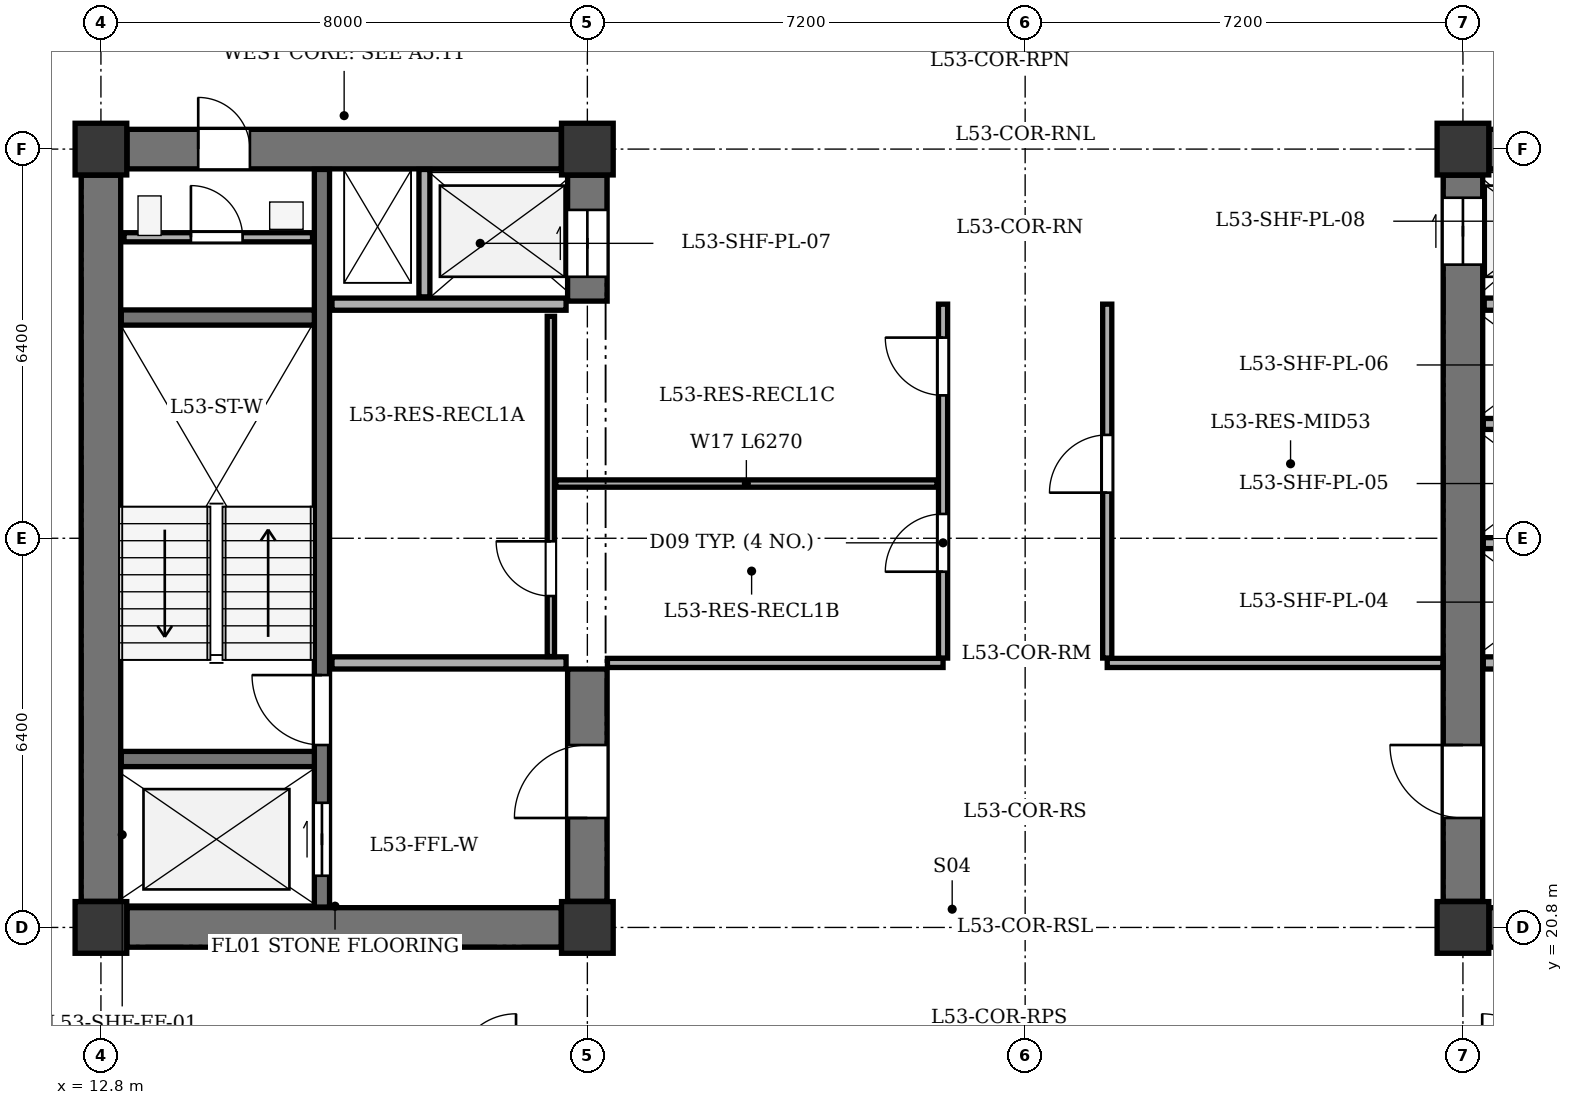
"""IFC4 building model, lengths in metres.
Left out: names, types, materials, properties, quantities, classifications, styles, units other than length and angle.
Written with IfcOpenShell. Run it as: python <this file> out.ifc"""

import sys

from ifc_helpers import new_model, si_unit, direction, frame, frame_2d, origin, origin_2d, place, context, subcontext, project, spatial, rectangle, extrude, element, fill, save


model = new_model("IFC4")
c1 = context("Model", 3, precision=1e-05, world=origin(), true_north=direction((0.0, 1.0)))
c2 = subcontext(c1, "Body", "Model", "MODEL_VIEW")
j1 = project(units=[si_unit("LENGTHUNIT", "METRE"), si_unit("PLANEANGLEUNIT", "RADIAN")], contexts=[c1])
p1 = place(None, origin())
s1 = spatial("IfcSite", under=j1, at=p1, CompositionType="ELEMENT")
p2 = place(p1, origin())
s2 = spatial("IfcBuilding", under=s1, at=p2, CompositionType="ELEMENT")
p3 = place(p2, frame((0.0, 0.0, 207.5)))
s3 = spatial("IfcBuildingStorey", under=s2, at=p3, CompositionType="ELEMENT", Elevation=207.5)
for number, where, z_axis, x_axis in (
    (1, (12.8, 20.8, 0.0), (0.0, 0.0, 1.0), (1.0, 0.0, 0.0)),
    (2, (20.8, 20.8, 0.0), (0.0, 0.0, 1.0), (1.0, 0.0, 0.0)),
    (3, (12.8, 33.6, 0.0), (0.0, 0.0, 1.0), (1.0, 0.0, 0.0)),
    (4, (20.8, 33.6, 0.0), (0.0, 0.0, 1.0), (1.0, 0.0, 0.0)),
    (5, (35.2, 20.8, 0.0), (0.0, 0.0, 1.0), (1.0, 0.0, 0.0)),
    (6, (35.2, 33.6, 0.0), (0.0, 0.0, 1.0), (1.0, 0.0, 0.0)),
):
    element("IfcColumn", number, at=place(p3, frame(where, z_axis=z_axis, x_axis=x_axis)), inside=s3, PredefinedType="COLUMN", context=c2, shape_type="SweptSolid", body=[
        extrude(rectangle(XDim=0.85, YDim=0.85, at=origin_2d()), origin(), (0.0, 0.0, 1.0), 3.4),
    ])
p4 = place(p3, frame((12.8, 21.23, 0.0), z_axis=(0.0, 0.0, 1.0), x_axis=(0.0, 1.0, 0.0)))
e7 = element("IfcWall", 7, at=p4, inside=s3, PredefinedType="SHEAR", context=c2, shape_type="SweptSolid", body=[
    extrude(rectangle(XDim=11.94, YDim=0.65, at=frame_2d((5.97, 0.0))), origin(), (0.0, 0.0, 1.0), 3.1),
])
p5 = place(p3, frame((13.23, 20.8, 0.0), z_axis=(0.0, 0.0, 1.0), x_axis=(1.0, 0.0, 0.0)))
e8 = element("IfcWall", 8, at=p5, inside=s3, PredefinedType="SHEAR", context=c2, shape_type="SweptSolid", body=[
    extrude(rectangle(XDim=7.14, YDim=0.65, at=frame_2d((3.57, 0.0))), origin(), (0.0, 0.0, 1.0), 3.1),
])
p6 = place(p3, frame((13.23, 33.6, 0.0), z_axis=(0.0, 0.0, 1.0), x_axis=(1.0, 0.0, 0.0)))
e9 = element("IfcWall", 9, at=p6, inside=s3, PredefinedType="SHEAR", context=c2, shape_type="SweptSolid", body=[
    extrude(rectangle(XDim=7.14, YDim=0.65, at=frame_2d((3.57, 0.0))), origin(), (0.0, 0.0, 1.0), 3.1),
])
p7 = place(p6, frame((1.17, 0.0, 0.0)))
e10 = element("IfcOpeningElement", 10, at=p7, cuts=e9, PredefinedType="OPENING", context=c2, shape_type="SweptSolid", body=[
    extrude(rectangle(XDim=0.85, YDim=2.02, at=frame_2d((0.425, 1.01))), frame((0.0, 0.335, 0.0), z_axis=(0.0, -1.0, 0.0), x_axis=(1.0, 0.0, 0.0)), (0.0, 0.0, 1.0), 0.67),
])
p8 = place(p3, frame((20.8, 21.23, 0.0), z_axis=(0.0, 0.0, 1.0), x_axis=(0.0, 1.0, 0.0)))
e11 = element("IfcWall", 11, at=p8, inside=s3, PredefinedType="SHEAR", context=c2, shape_type="SweptSolid", body=[
    extrude(rectangle(XDim=3.82, YDim=0.65, at=frame_2d((1.91, 0.0))), origin(), (0.0, 0.0, 1.0), 3.1),
])
p9 = place(p8, frame((1.37, 0.0, 0.0)))
e12 = element("IfcOpeningElement", 12, at=p9, cuts=e11, PredefinedType="OPENING", context=c2, shape_type="SweptSolid", body=[
    extrude(rectangle(XDim=1.2, YDim=2.15, at=frame_2d((0.6, 1.075))), frame((0.0, 0.335, 0.0), z_axis=(0.0, -1.0, 0.0), x_axis=(1.0, 0.0, 0.0)), (0.0, 0.0, 1.0), 0.67),
])
p10 = place(p3, frame((20.8, 31.1, 0.0), z_axis=(0.0, 0.0, 1.0), x_axis=(0.0, 1.0, 0.0)))
e13 = element("IfcWall", 13, at=p10, inside=s3, PredefinedType="SHEAR", context=c2, shape_type="SweptSolid", body=[
    extrude(rectangle(XDim=2.07, YDim=0.65, at=frame_2d((1.035, 0.0))), origin(), (0.0, 0.0, 1.0), 3.1),
])
p11 = place(p10, frame((0.4, 0.0, 0.0)))
e14 = element("IfcOpeningElement", 14, at=p11, cuts=e13, PredefinedType="OPENING", context=c2, shape_type="SweptSolid", body=[
    extrude(rectangle(XDim=1.1, YDim=2.1, at=frame_2d((0.55, 1.05))), frame((0.0, 0.335, 0.0), z_axis=(0.0, -1.0, 0.0), x_axis=(1.0, 0.0, 0.0)), (0.0, 0.0, 1.0), 0.67),
])
p12 = place(p3, frame((16.435, 21.135, 0.0), z_axis=(0.0, 0.0, 1.0), x_axis=(0.0, 1.0, 0.0)))
e15 = element("IfcWall", 15, at=p12, inside=s3, PredefinedType="SHEAR", context=c2, shape_type="SweptSolid", body=[
    extrude(rectangle(XDim=12.13, YDim=0.25, at=frame_2d((6.065, 0.0))), origin(), (0.0, 0.0, 1.0), 3.1),
])
p13 = place(p12, frame((0.515, 0.0, 0.0)))
e16 = element("IfcOpeningElement", 16, at=p13, cuts=e15, PredefinedType="OPENING", context=c2, shape_type="SweptSolid", body=[
    extrude(rectangle(XDim=1.2, YDim=2.15, at=frame_2d((0.6, 1.075))), frame((0.0, 0.135, 0.0), z_axis=(0.0, -1.0, 0.0), x_axis=(1.0, 0.0, 0.0)), (0.0, 0.0, 1.0), 0.27),
])
p14 = place(p12, frame((2.665, 0.0, 0.0)))
e17 = element("IfcOpeningElement", 17, at=p14, cuts=e15, PredefinedType="OPENING", context=c2, shape_type="SweptSolid", body=[
    extrude(rectangle(XDim=1.15, YDim=2.15, at=frame_2d((0.575, 1.075))), frame((0.0, 0.135, 0.0), z_axis=(0.0, -1.0, 0.0), x_axis=(1.0, 0.0, 0.0)), (0.0, 0.0, 1.0), 0.27),
])
for number, where, z_axis, x_axis in (
    (18, (13.135, 23.57, 0.0), (0.0, 0.0, 1.0), (1.0, 0.0, 0.0)),
    (19, (13.135, 30.83, 0.0), (0.0, 0.0, 1.0), (1.0, 0.0, 0.0)),
):
    element("IfcWall", number, at=place(p3, frame(where, z_axis=z_axis, x_axis=x_axis)), inside=s3, PredefinedType="SHEAR", context=c2, shape_type="SweptSolid", body=[
        extrude(rectangle(XDim=3.175, YDim=0.25, at=frame_2d((1.587, 0.0))), origin(), (0.0, 0.0, 1.0), 3.1),
    ])
for number, where, z_axis, x_axis in (
    (20, (16.6, 25.15, 0.0), (0.0, 0.0, 1.0), (1.0, 0.0, 0.0)),
    (21, (16.6, 31.05, 0.0), (0.0, 0.0, 1.0), (1.0, 0.0, 0.0)),
):
    element("IfcWall", number, at=place(p3, frame(where, z_axis=z_axis, x_axis=x_axis)), inside=s3, PredefinedType="SOLIDWALL", context=c2, shape_type="SweptSolid", body=[
        extrude(rectangle(XDim=3.85, YDim=0.2, at=frame_2d((1.925, 0.0))), origin(), (0.0, 0.0, 1.0), 3.1),
    ])
p15 = place(p3, frame((18.12, 31.17, 0.0), z_axis=(0.0, 0.0, 1.0), x_axis=(0.0, 1.0, 0.0)))
e22 = element("IfcWall", 22, at=p15, inside=s3, PredefinedType="PARTITIONING", context=c2, shape_type="SweptSolid", body=[
    extrude(rectangle(XDim=2.095, YDim=0.18, at=frame_2d((1.047, 0.0))), origin(), (0.0, 0.0, 1.0), 3.1),
])
p16 = place(p3, frame((35.63, 20.8, 0.0), z_axis=(0.0, 0.0, 1.0), x_axis=(1.0, 0.0, 0.0)))
e23 = element("IfcWall", 23, at=p16, inside=s3, PredefinedType="SHEAR", context=c2, shape_type="SweptSolid", body=[
    extrude(rectangle(XDim=7.14, YDim=0.65, at=frame_2d((3.57, 0.0))), origin(), (0.0, 0.0, 1.0), 3.1),
])
p17 = place(p3, frame((35.63, 33.6, 0.0), z_axis=(0.0, 0.0, 1.0), x_axis=(1.0, 0.0, 0.0)))
e24 = element("IfcWall", 24, at=p17, inside=s3, PredefinedType="SHEAR", context=c2, shape_type="SweptSolid", body=[
    extrude(rectangle(XDim=7.14, YDim=0.65, at=frame_2d((3.57, 0.0))), origin(), (0.0, 0.0, 1.0), 3.1),
])
p18 = place(p17, frame((4.77, 0.0, 0.0)))
e25 = element("IfcOpeningElement", 25, at=p18, cuts=e24, PredefinedType="OPENING", context=c2, shape_type="SweptSolid", body=[
    extrude(rectangle(XDim=1.3, YDim=2.15, at=frame_2d((0.65, 1.075))), frame((0.0, 0.335, 0.0), z_axis=(0.0, -1.0, 0.0), x_axis=(1.0, 0.0, 0.0)), (0.0, 0.0, 1.0), 0.67),
])
p19 = place(p17, frame((2.57, 0.0, 0.0)))
e26 = element("IfcOpeningElement", 26, at=p19, cuts=e24, PredefinedType="OPENING", context=c2, shape_type="SweptSolid", body=[
    extrude(rectangle(XDim=0.85, YDim=2.02, at=frame_2d((0.425, 1.01))), frame((0.0, 0.335, 0.0), z_axis=(0.0, -1.0, 0.0), x_axis=(1.0, 0.0, 0.0)), (0.0, 0.0, 1.0), 0.67),
])
p20 = place(p3, frame((35.2, 21.23, 0.0), z_axis=(0.0, 0.0, 1.0), x_axis=(0.0, 1.0, 0.0)))
e27 = element("IfcWall", 27, at=p20, inside=s3, PredefinedType="SHEAR", context=c2, shape_type="SweptSolid", body=[
    extrude(rectangle(XDim=11.94, YDim=0.65, at=frame_2d((5.97, 0.0))), origin(), (0.0, 0.0, 1.0), 3.1),
])
p21 = place(p20, frame((1.37, 0.0, 0.0)))
e28 = element("IfcOpeningElement", 28, at=p21, cuts=e27, PredefinedType="OPENING", context=c2, shape_type="SweptSolid", body=[
    extrude(rectangle(XDim=1.2, YDim=2.15, at=frame_2d((0.6, 1.075))), frame((0.0, 0.335, 0.0), z_axis=(0.0, -1.0, 0.0), x_axis=(1.0, 0.0, 0.0)), (0.0, 0.0, 1.0), 0.67),
])
p22 = place(p20, frame((10.47, 0.0, 0.0)))
e29 = element("IfcOpeningElement", 29, at=p22, cuts=e27, PredefinedType="OPENING", context=c2, shape_type="SweptSolid", body=[
    extrude(rectangle(XDim=1.1, YDim=2.1, at=frame_2d((0.55, 1.05))), frame((0.0, 0.335, 0.0), z_axis=(0.0, -1.0, 0.0), x_axis=(1.0, 0.0, 0.0)), (0.0, 0.0, 1.0), 0.67),
])
p23 = place(p3, frame((35.535, 25.15, 0.0), z_axis=(0.0, 0.0, 1.0), x_axis=(1.0, 0.0, 0.0)))
e30 = element("IfcWall", 30, at=p23, inside=s3, PredefinedType="SOLIDWALL", context=c2, shape_type="SweptSolid", body=[
    extrude(rectangle(XDim=3.865, YDim=0.2, at=frame_2d((1.933, 0.0))), origin(), (0.0, 0.0, 1.0), 3.1),
])
p24 = place(p3, frame((35.55, 31.05, 0.0), z_axis=(0.0, 0.0, 1.0), x_axis=(1.0, 0.0, 0.0)))
e31 = element("IfcWall", 31, at=p24, inside=s3, PredefinedType="SOLIDWALL", context=c2, shape_type="SweptSolid", body=[
    extrude(rectangle(XDim=2.25, YDim=0.2, at=frame_2d((1.125, 0.0))), origin(), (0.0, 0.0, 1.0), 3.1),
])
for number, where, z_axis, x_axis in (
    (32, (35.535, 27.12, 0.0), (0.0, 0.0, 1.0), (1.0, 0.0, 0.0)),
    (33, (35.535, 29.08, 0.0), (0.0, 0.0, 1.0), (1.0, 0.0, 0.0)),
):
    element("IfcWall", number, at=place(p3, frame(where, z_axis=z_axis, x_axis=x_axis)), inside=s3, PredefinedType="PARTITIONING", context=c2, shape_type="SweptSolid", body=[
        extrude(rectangle(XDim=2.245, YDim=0.18, at=frame_2d((1.123, 0.0))), origin(), (0.0, 0.0, 1.0), 3.1),
    ])
p25 = place(p3, frame((13.18, 32.15, 0.0), z_axis=(0.0, 0.0, 1.0), x_axis=(1.0, 0.0, 0.0)))
e34 = element("IfcWall", 34, at=p25, inside=s3, PredefinedType="PARTITIONING", context=c2, shape_type="SweptSolid", body=[
    extrude(rectangle(XDim=3.1, YDim=0.15, at=frame_2d((1.55, 0.0))), origin(), (0.0, 0.0, 1.0), 3.1),
])
p26 = place(p25, frame((1.1, 0.0, 0.0)))
e35 = element("IfcOpeningElement", 35, at=p26, cuts=e34, PredefinedType="OPENING", context=c2, shape_type="SweptSolid", body=[
    extrude(rectangle(XDim=0.85, YDim=2.02, at=frame_2d((0.425, 1.01))), frame((0.0, 0.085, 0.0), z_axis=(0.0, -1.0, 0.0), x_axis=(1.0, 0.0, 0.0)), (0.0, 0.0, 1.0), 0.17),
])
for number, where, z_axis, x_axis in (
    (36, (21.13, 25.15, 0.0), (0.0, 0.0, 1.0), (1.0, 0.0, 0.0)),
    (37, (29.35, 25.15, 0.0), (0.0, 0.0, 1.0), (1.0, 0.0, 0.0)),
):
    element("IfcWall", number, at=place(p3, frame(where, z_axis=z_axis, x_axis=x_axis)), inside=s3, PredefinedType="PARTITIONING", context=c2, shape_type="SweptSolid", body=[
        extrude(rectangle(XDim=5.52, YDim=0.15, at=frame_2d((2.76, 0.0))), origin(), (0.0, 0.0, 1.0), 3.1),
    ])
p27 = place(p3, frame((26.65, 25.23, 0.0), z_axis=(0.0, 0.0, 1.0), x_axis=(0.0, 1.0, 0.0)))
e38 = element("IfcWall", 38, at=p27, inside=s3, PredefinedType="PARTITIONING", context=c2, shape_type="SweptSolid", body=[
    extrude(rectangle(XDim=5.82, YDim=0.15, at=frame_2d((2.91, 0.0))), origin(), (0.0, 0.0, 1.0), 3.1),
])
p28 = place(p27, frame((1.42, 0.0, 0.0)))
e39 = element("IfcOpeningElement", 39, at=p28, cuts=e38, PredefinedType="OPENING", context=c2, shape_type="SweptSolid", body=[
    extrude(rectangle(XDim=0.95, YDim=2.1, at=frame_2d((0.475, 1.05))), frame((0.0, 0.085, 0.0), z_axis=(0.0, -1.0, 0.0), x_axis=(1.0, 0.0, 0.0)), (0.0, 0.0, 1.0), 0.17),
])
p29 = place(p27, frame((4.32, 0.0, 0.0)))
e40 = element("IfcOpeningElement", 40, at=p29, cuts=e38, PredefinedType="OPENING", context=c2, shape_type="SweptSolid", body=[
    extrude(rectangle(XDim=0.95, YDim=2.1, at=frame_2d((0.475, 1.05))), frame((0.0, 0.085, 0.0), z_axis=(0.0, -1.0, 0.0), x_axis=(1.0, 0.0, 0.0)), (0.0, 0.0, 1.0), 0.17),
])
p30 = place(p3, frame((20.2, 25.255, 0.0), z_axis=(0.0, 0.0, 1.0), x_axis=(0.0, 1.0, 0.0)))
e41 = element("IfcWall", 41, at=p30, inside=s3, PredefinedType="PARTITIONING", context=c2, shape_type="SweptSolid", body=[
    extrude(rectangle(XDim=5.595, YDim=0.12, at=frame_2d((2.798, 0.0))), origin(), (0.0, 0.0, 1.0), 3.1),
])
p31 = place(p30, frame((0.995, 0.0, 0.0)))
e42 = element("IfcOpeningElement", 42, at=p31, cuts=e41, PredefinedType="OPENING", context=c2, shape_type="SweptSolid", body=[
    extrude(rectangle(XDim=0.9, YDim=2.05, at=frame_2d((0.45, 1.025))), frame((0.0, 0.07, 0.0), z_axis=(0.0, -1.0, 0.0), x_axis=(1.0, 0.0, 0.0)), (0.0, 0.0, 1.0), 0.14),
])
p32 = place(p3, frame((20.28, 28.1, 0.0), z_axis=(0.0, 0.0, 1.0), x_axis=(1.0, 0.0, 0.0)))
e43 = element("IfcWall", 43, at=p32, inside=s3, PredefinedType="PARTITIONING", context=c2, shape_type="SweptSolid", body=[
    extrude(rectangle(XDim=6.27, YDim=0.12, at=frame_2d((3.135, 0.0))), origin(), (0.0, 0.0, 1.0), 3.1),
])
p33 = place(p3, frame((29.35, 25.23, 0.0), z_axis=(0.0, 0.0, 1.0), x_axis=(0.0, 1.0, 0.0)))
e44 = element("IfcWall", 44, at=p33, inside=s3, PredefinedType="PARTITIONING", context=c2, shape_type="SweptSolid", body=[
    extrude(rectangle(XDim=5.82, YDim=0.15, at=frame_2d((2.91, 0.0))), origin(), (0.0, 0.0, 1.0), 3.1),
])
p34 = place(p33, frame((2.72, 0.0, 0.0)))
e45 = element("IfcOpeningElement", 45, at=p34, cuts=e44, PredefinedType="OPENING", context=c2, shape_type="SweptSolid", body=[
    extrude(rectangle(XDim=0.95, YDim=2.1, at=frame_2d((0.475, 1.05))), frame((0.0, 0.085, 0.0), z_axis=(0.0, -1.0, 0.0), x_axis=(1.0, 0.0, 0.0)), (0.0, 0.0, 1.0), 0.17),
])
p35 = place(p7, origin())
e46 = element("IfcDoor", 46, at=p35, inside=s3, OperationType="SINGLE_SWING_LEFT", PredefinedType="DOOR", context=c2, shape_type="SweptSolid", body=[
    extrude(rectangle(XDim=0.85, YDim=2.02, at=frame_2d((0.425, 1.01))), frame((0.0, 0.025, 0.0), z_axis=(0.0, -1.0, 0.0), x_axis=(1.0, 0.0, 0.0)), (0.0, 0.0, 1.0), 0.05),
])
fill(e10, e46)
p36 = place(p9, origin())
e47 = element("IfcDoor", 47, at=p36, inside=s3, OperationType="SINGLE_SWING_LEFT", PredefinedType="DOOR", context=c2, shape_type="SweptSolid", body=[
    extrude(rectangle(XDim=1.2, YDim=2.15, at=frame_2d((0.6, 1.075))), frame((0.0, 0.025, 0.0), z_axis=(0.0, -1.0, 0.0), x_axis=(1.0, 0.0, 0.0)), (0.0, 0.0, 1.0), 0.05),
])
fill(e12, e47)
p37 = place(p11, origin())
e48 = element("IfcDoor", 48, at=p37, inside=s3, OperationType="DOUBLE_DOOR_SLIDING", PredefinedType="DOOR", context=c2, shape_type="SweptSolid", body=[
    extrude(rectangle(XDim=1.1, YDim=2.1, at=frame_2d((0.55, 1.05))), frame((0.0, 0.025, 0.0), z_axis=(0.0, -1.0, 0.0), x_axis=(1.0, 0.0, 0.0)), (0.0, 0.0, 1.0), 0.05),
])
fill(e14, e48)
p38 = place(p13, origin())
e49 = element("IfcDoor", 49, at=p38, inside=s3, OperationType="DOUBLE_DOOR_SLIDING", PredefinedType="DOOR", context=c2, shape_type="SweptSolid", body=[
    extrude(rectangle(XDim=1.2, YDim=2.15, at=frame_2d((0.6, 1.075))), frame((0.0, 0.025, 0.0), z_axis=(0.0, -1.0, 0.0), x_axis=(1.0, 0.0, 0.0)), (0.0, 0.0, 1.0), 0.05),
])
fill(e16, e49)
p39 = place(p14, origin())
e50 = element("IfcDoor", 50, at=p39, inside=s3, OperationType="SINGLE_SWING_RIGHT", PredefinedType="DOOR", context=c2, shape_type="SweptSolid", body=[
    extrude(rectangle(XDim=1.15, YDim=2.15, at=frame_2d((0.575, 1.075))), frame((0.0, 0.025, 0.0), z_axis=(0.0, -1.0, 0.0), x_axis=(1.0, 0.0, 0.0)), (0.0, 0.0, 1.0), 0.05),
])
fill(e17, e50)
p40 = place(p21, origin())
e51 = element("IfcDoor", 51, at=p40, inside=s3, OperationType="SINGLE_SWING_RIGHT", PredefinedType="DOOR", context=c2, shape_type="SweptSolid", body=[
    extrude(rectangle(XDim=1.2, YDim=2.15, at=frame_2d((0.6, 1.075))), frame((0.0, 0.025, 0.0), z_axis=(0.0, -1.0, 0.0), x_axis=(1.0, 0.0, 0.0)), (0.0, 0.0, 1.0), 0.05),
])
fill(e28, e51)
p41 = place(p22, origin())
e52 = element("IfcDoor", 52, at=p41, inside=s3, OperationType="DOUBLE_DOOR_SLIDING", PredefinedType="DOOR", context=c2, shape_type="SweptSolid", body=[
    extrude(rectangle(XDim=1.1, YDim=2.1, at=frame_2d((0.55, 1.05))), frame((0.0, 0.025, 0.0), z_axis=(0.0, -1.0, 0.0), x_axis=(1.0, 0.0, 0.0)), (0.0, 0.0, 1.0), 0.05),
])
fill(e29, e52)
p42 = place(p26, origin())
e53 = element("IfcDoor", 53, at=p42, inside=s3, OperationType="SINGLE_SWING_LEFT", PredefinedType="DOOR", context=c2, shape_type="SweptSolid", body=[
    extrude(rectangle(XDim=0.85, YDim=2.02, at=frame_2d((0.425, 1.01))), frame((0.0, 0.025, 0.0), z_axis=(0.0, -1.0, 0.0), x_axis=(1.0, 0.0, 0.0)), (0.0, 0.0, 1.0), 0.05),
])
fill(e35, e53)
p43 = place(p31, origin())
e54 = element("IfcDoor", 54, at=p43, inside=s3, OperationType="SINGLE_SWING_RIGHT", PredefinedType="DOOR", context=c2, shape_type="SweptSolid", body=[
    extrude(rectangle(XDim=0.9, YDim=2.05, at=frame_2d((0.45, 1.025))), frame((0.0, 0.025, 0.0), z_axis=(0.0, -1.0, 0.0), x_axis=(1.0, 0.0, 0.0)), (0.0, 0.0, 1.0), 0.05),
])
fill(e42, e54)
p44 = place(p28, origin())
e55 = element("IfcDoor", 55, at=p44, inside=s3, OperationType="SINGLE_SWING_LEFT", PredefinedType="DOOR", context=c2, shape_type="SweptSolid", body=[
    extrude(rectangle(XDim=0.95, YDim=2.1, at=frame_2d((0.475, 1.05))), frame((0.0, 0.025, 0.0), z_axis=(0.0, -1.0, 0.0), x_axis=(1.0, 0.0, 0.0)), (0.0, 0.0, 1.0), 0.05),
])
fill(e39, e55)
p45 = place(p29, origin())
e56 = element("IfcDoor", 56, at=p45, inside=s3, OperationType="SINGLE_SWING_RIGHT", PredefinedType="DOOR", context=c2, shape_type="SweptSolid", body=[
    extrude(rectangle(XDim=0.95, YDim=2.1, at=frame_2d((0.475, 1.05))), frame((0.0, 0.025, 0.0), z_axis=(0.0, -1.0, 0.0), x_axis=(1.0, 0.0, 0.0)), (0.0, 0.0, 1.0), 0.05),
])
fill(e40, e56)
p46 = place(p34, origin())
e57 = element("IfcDoor", 57, at=p46, inside=s3, OperationType="SINGLE_SWING_LEFT", PredefinedType="DOOR", context=c2, shape_type="SweptSolid", body=[
    extrude(rectangle(XDim=0.95, YDim=2.1, at=frame_2d((0.475, 1.05))), frame((0.0, 0.025, 0.0), z_axis=(0.0, -1.0, 0.0), x_axis=(1.0, 0.0, 0.0)), (0.0, 0.0, 1.0), 0.05),
])
fill(e45, e57)
save(model, sys.argv[1])
